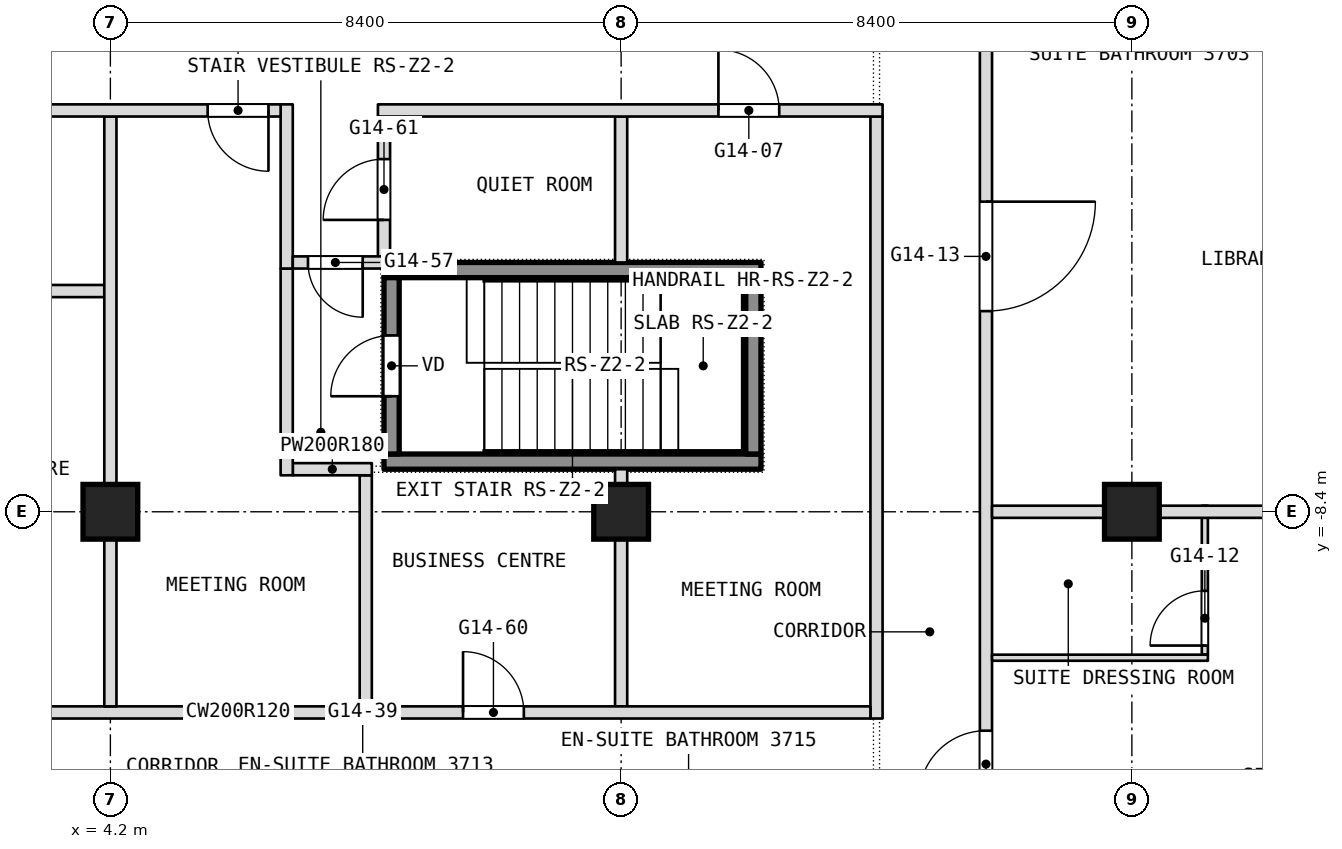
"""IFC4 building model, lengths in metres.
Left out: names, types, materials, properties, quantities, classifications, styles, units other than length and angle.
Written with IfcOpenShell. Run it as: python <this file> out.ifc"""

import sys

from ifc_helpers import new_model, si_unit, direction, frame, frame_2d, origin, origin_2d, place, context, subcontext, project, spatial, rectangle, extrude, element, fill, save


model = new_model("IFC4")
c1 = context("Model", 3, precision=1e-05, world=origin(), true_north=direction((0.0, 1.0)))
c2 = subcontext(c1, "Body", "Model", "MODEL_VIEW")
j1 = project(units=[si_unit("LENGTHUNIT", "METRE"), si_unit("PLANEANGLEUNIT", "RADIAN")], contexts=[c1])
p1 = place(None, origin())
s1 = spatial("IfcSite", under=j1, at=p1, CompositionType="ELEMENT")
p2 = place(p1, origin())
s2 = spatial("IfcBuilding", under=s1, at=p2, CompositionType="ELEMENT")
p3 = place(p2, frame((0.0, 0.0, 158.9)))
s3 = spatial("IfcBuildingStorey", under=s2, at=p3, CompositionType="ELEMENT", Elevation=158.9)
for number, where, z_axis, x_axis in (
    (1, (4.2, -8.4, 0.0), (0.0, 0.0, 1.0), (1.0, 0.0, 0.0)),
    (2, (12.6, -8.4, 0.0), (0.0, 0.0, 1.0), (1.0, 0.0, 0.0)),
    (3, (21.0, -8.4, 0.0), (0.0, 0.0, 1.0), (1.0, 0.0, 0.0)),
):
    element("IfcColumn", number, at=place(p3, frame(where, z_axis=z_axis, x_axis=x_axis)), inside=s3, PredefinedType="COLUMN", context=c2, shape_type="SweptSolid", body=[
        extrude(rectangle(XDim=0.9, YDim=0.9, at=origin_2d()), origin(), (0.0, 0.0, 1.0), 3.6),
    ])
p4 = place(p3, frame((22.2, -10.75, 0.0), z_axis=(0.0, 0.0, 1.0), x_axis=(0.0, 1.0, 0.0)))
e4 = element("IfcWall", 4, at=p4, inside=s3, PredefinedType="PARTITIONING", context=c2, shape_type="SweptSolid", body=[
    extrude(rectangle(XDim=2.45, YDim=0.1, at=frame_2d((1.225, 0.0))), origin(), (0.0, 0.0, 1.0), 3.34),
])
p5 = place(p4, frame((0.15, 0.0, 0.0)))
e5 = element("IfcOpeningElement", 5, at=p5, cuts=e4, PredefinedType="OPENING", context=c2, shape_type="SweptSolid", body=[
    extrude(rectangle(XDim=0.9, YDim=2.1, at=frame_2d((0.45, 1.05))), frame((0.0, 0.05, 0.0), z_axis=(0.0, -1.0, 0.0), x_axis=(1.0, 0.0, 0.0)), (0.0, 0.0, 1.0), 0.1),
])
p6 = place(p3, frame((18.6, -21.708, 0.0), z_axis=(0.0, 0.0, 1.0), x_axis=(0.0, 1.0, 0.0)))
e6 = element("IfcWall", 6, at=p6, inside=s3, PredefinedType="PARTITIONING", context=c2, shape_type="SweptSolid", body=[
    extrude(rectangle(XDim=49.648, YDim=0.2, at=frame_2d((24.824, 0.0))), origin(), (0.0, 0.0, 1.0), 3.34),
])
p7 = place(p6, frame((2.204, 0.0, 0.0)))
e7 = element("IfcOpeningElement", 7, at=p7, cuts=e6, PredefinedType="OPENING", context=c2, shape_type="SweptSolid", body=[
    extrude(rectangle(XDim=0.9, YDim=2.1, at=frame_2d((0.45, 1.05))), frame((0.0, 0.1, 0.0), z_axis=(0.0, -1.0, 0.0), x_axis=(1.0, 0.0, 0.0)), (0.0, 0.0, 1.0), 0.2),
])
p8 = place(p6, frame((8.608, 0.0, 0.0)))
e8 = element("IfcOpeningElement", 8, at=p8, cuts=e6, PredefinedType="OPENING", context=c2, shape_type="SweptSolid", body=[
    extrude(rectangle(XDim=1.1, YDim=2.1, at=frame_2d((0.55, 1.05))), frame((0.0, 0.1, 0.0), z_axis=(0.0, -1.0, 0.0), x_axis=(1.0, 0.0, 0.0)), (0.0, 0.0, 1.0), 0.2),
])
p9 = place(p6, frame((16.608, 0.0, 0.0)))
e9 = element("IfcOpeningElement", 9, at=p9, cuts=e6, PredefinedType="OPENING", context=c2, shape_type="SweptSolid", body=[
    extrude(rectangle(XDim=1.8, YDim=2.1, at=frame_2d((0.9, 1.05))), frame((0.0, 0.1, 0.0), z_axis=(0.0, -1.0, 0.0), x_axis=(1.0, 0.0, 0.0)), (0.0, 0.0, 1.0), 0.2),
])
p10 = place(p6, frame((27.458, 0.0, 0.0)))
e10 = element("IfcOpeningElement", 10, at=p10, cuts=e6, PredefinedType="OPENING", context=c2, shape_type="SweptSolid", body=[
    extrude(rectangle(XDim=1.1, YDim=2.1, at=frame_2d((0.55, 1.05))), frame((0.0, 0.1, 0.0), z_axis=(0.0, -1.0, 0.0), x_axis=(1.0, 0.0, 0.0)), (0.0, 0.0, 1.0), 0.2),
])
p11 = place(p6, frame((30.508, 0.0, 0.0)))
e11 = element("IfcOpeningElement", 11, at=p11, cuts=e6, PredefinedType="OPENING", context=c2, shape_type="SweptSolid", body=[
    extrude(rectangle(XDim=1.0, YDim=2.1, at=frame_2d((0.5, 1.05))), frame((0.0, 0.1, 0.0), z_axis=(0.0, -1.0, 0.0), x_axis=(1.0, 0.0, 0.0)), (0.0, 0.0, 1.0), 0.2),
])
p12 = place(p6, frame((37.108, 0.0, 0.0)))
e12 = element("IfcOpeningElement", 12, at=p12, cuts=e6, PredefinedType="OPENING", context=c2, shape_type="SweptSolid", body=[
    extrude(rectangle(XDim=1.0, YDim=2.1, at=frame_2d((0.5, 1.05))), frame((0.0, 0.1, 0.0), z_axis=(0.0, -1.0, 0.0), x_axis=(1.0, 0.0, 0.0)), (0.0, 0.0, 1.0), 0.2),
])
p13 = place(p6, frame((42.608, 0.0, 0.0)))
e13 = element("IfcOpeningElement", 13, at=p13, cuts=e6, PredefinedType="OPENING", context=c2, shape_type="SweptSolid", body=[
    extrude(rectangle(XDim=1.0, YDim=2.1, at=frame_2d((0.5, 1.05))), frame((0.0, 0.1, 0.0), z_axis=(0.0, -1.0, 0.0), x_axis=(1.0, 0.0, 0.0)), (0.0, 0.0, 1.0), 0.2),
])
p14 = place(p6, frame((44.608, 0.0, 0.0)))
e14 = element("IfcOpeningElement", 14, at=p14, cuts=e6, PredefinedType="OPENING", context=c2, shape_type="SweptSolid", body=[
    extrude(rectangle(XDim=1.0, YDim=2.1, at=frame_2d((0.5, 1.05))), frame((0.0, 0.1, 0.0), z_axis=(0.0, -1.0, 0.0), x_axis=(1.0, 0.0, 0.0)), (0.0, 0.0, 1.0), 0.2),
])
p15 = place(p3, frame((16.8, -11.8, 0.0), z_axis=(0.0, 0.0, 1.0), x_axis=(0.0, 1.0, 0.0)))
e15 = element("IfcWall", 15, at=p15, inside=s3, PredefinedType="PARTITIONING", context=c2, shape_type="SweptSolid", body=[
    extrude(rectangle(XDim=9.9, YDim=0.2, at=frame_2d((4.95, 0.0))), origin(), (0.0, 0.0, 1.0), 3.34),
])
p16 = place(p3, frame((12.6, -11.6, 0.0), z_axis=(0.0, 0.0, 1.0), x_axis=(0.0, 1.0, 0.0)))
e16 = element("IfcWall", 16, at=p16, inside=s3, PredefinedType="PARTITIONING", context=c2, shape_type="SweptSolid", body=[
    extrude(rectangle(XDim=3.9, YDim=0.2, at=frame_2d((1.95, 0.0))), origin(), (0.0, 0.0, 1.0), 3.34),
])
p17 = place(p3, frame((12.6, -4.3, 0.0), z_axis=(0.0, 0.0, 1.0), x_axis=(0.0, 1.0, 0.0)))
e17 = element("IfcWall", 17, at=p17, inside=s3, PredefinedType="PARTITIONING", context=c2, shape_type="SweptSolid", body=[
    extrude(rectangle(XDim=2.4, YDim=0.2, at=frame_2d((1.2, 0.0))), origin(), (0.0, 0.0, 1.0), 3.34),
])
p18 = place(p3, frame((-4.1, -11.7, 0.0), z_axis=(0.0, 0.0, 1.0), x_axis=(1.0, 0.0, 0.0)))
e18 = element("IfcWall", 18, at=p18, inside=s3, PredefinedType="PARTITIONING", context=c2, shape_type="SweptSolid", body=[
    extrude(rectangle(XDim=20.8, YDim=0.2, at=frame_2d((10.4, 0.0))), origin(), (0.0, 0.0, 1.0), 3.34),
])
p19 = place(p18, frame((14.1, 0.0, 0.0)))
e19 = element("IfcOpeningElement", 19, at=p19, cuts=e18, PredefinedType="OPENING", context=c2, shape_type="SweptSolid", body=[
    extrude(rectangle(XDim=1.0, YDim=2.1, at=frame_2d((0.5, 1.05))), frame((0.0, 0.1, 0.0), z_axis=(0.0, -1.0, 0.0), x_axis=(1.0, 0.0, 0.0)), (0.0, 0.0, 1.0), 0.2),
])
p20 = place(p18, frame((5.7, 0.0, 0.0)))
e20 = element("IfcOpeningElement", 20, at=p20, cuts=e18, PredefinedType="OPENING", context=c2, shape_type="SweptSolid", body=[
    extrude(rectangle(XDim=1.0, YDim=2.1, at=frame_2d((0.5, 1.05))), frame((0.0, 0.1, 0.0), z_axis=(0.0, -1.0, 0.0), x_axis=(1.0, 0.0, 0.0)), (0.0, 0.0, 1.0), 0.2),
])
p21 = place(p3, frame((18.7, -10.8, 0.0), z_axis=(0.0, 0.0, 1.0), x_axis=(1.0, 0.0, 0.0)))
e21 = element("IfcWall", 21, at=p21, inside=s3, PredefinedType="PARTITIONING", context=c2, shape_type="SweptSolid", body=[
    extrude(rectangle(XDim=3.55, YDim=0.1, at=frame_2d((1.775, 0.0))), origin(), (0.0, 0.0, 1.0), 3.34),
])
p22 = place(p3, frame((8.7, -4.3, 0.0), z_axis=(0.0, 0.0, 1.0), x_axis=(0.0, 1.0, 0.0)))
e22 = element("IfcWall", 22, at=p22, inside=s3, PredefinedType="PARTITIONING", context=c2, shape_type="SweptSolid", body=[
    extrude(rectangle(XDim=2.4, YDim=0.2, at=frame_2d((1.2, 0.0))), origin(), (0.0, 0.0, 1.0), 3.34),
])
p23 = place(p22, frame((0.7, 0.0, 0.0)))
e23 = element("IfcOpeningElement", 23, at=p23, cuts=e22, PredefinedType="OPENING", context=c2, shape_type="SweptSolid", body=[
    extrude(rectangle(XDim=1.0, YDim=2.1, at=frame_2d((0.5, 1.05))), frame((0.0, 0.1, 0.0), z_axis=(0.0, -1.0, 0.0), x_axis=(1.0, 0.0, 0.0)), (0.0, 0.0, 1.0), 0.2),
])
p24 = place(p3, frame((8.4, -11.6, 0.0), z_axis=(0.0, 0.0, 1.0), x_axis=(0.0, 1.0, 0.0)))
e24 = element("IfcWall", 24, at=p24, inside=s3, PredefinedType="PARTITIONING", context=c2, shape_type="SweptSolid", body=[
    extrude(rectangle(XDim=3.8, YDim=0.2, at=frame_2d((1.9, 0.0))), origin(), (0.0, 0.0, 1.0), 3.34),
])
p25 = place(p3, frame((18.7, -8.4, 0.0), z_axis=(0.0, 0.0, 1.0), x_axis=(1.0, 0.0, 0.0)))
e25 = element("IfcWall", 25, at=p25, inside=s3, PredefinedType="PARTITIONING", context=c2, shape_type="SweptSolid", body=[
    extrude(rectangle(XDim=8.9, YDim=0.2, at=frame_2d((4.45, 0.0))), origin(), (0.0, 0.0, 1.0), 2.89),
])
p26 = place(p3, frame((7.2, -7.7, 0.0), z_axis=(0.0, 0.0, 1.0), x_axis=(1.0, 0.0, 0.0)))
e26 = element("IfcWall", 26, at=p26, inside=s3, PredefinedType="PARTITIONING", context=c2, shape_type="SweptSolid", body=[
    extrude(rectangle(XDim=1.3, YDim=0.2, at=frame_2d((0.65, 0.0))), origin(), (0.0, 0.0, 1.0), 3.34),
])
p27 = place(p3, frame((7.1, -7.8, 0.0), z_axis=(0.0, 0.0, 1.0), x_axis=(0.0, 1.0, 0.0)))
e27 = element("IfcWall", 27, at=p27, inside=s3, PredefinedType="PARTITIONING", context=c2, shape_type="SweptSolid", body=[
    extrude(rectangle(XDim=3.4, YDim=0.2, at=frame_2d((1.7, 0.0))), origin(), (0.0, 0.0, 1.0), 3.34),
])
p28 = place(p3, frame((7.1, -4.4, 0.0), z_axis=(0.0, 0.0, 1.0), x_axis=(0.0, 1.0, 0.0)))
e28 = element("IfcWall", 28, at=p28, inside=s3, PredefinedType="PARTITIONING", context=c2, shape_type="SweptSolid", body=[
    extrude(rectangle(XDim=2.7, YDim=0.2, at=frame_2d((1.35, 0.0))), origin(), (0.0, 0.0, 1.0), 3.34),
])
p29 = place(p3, frame((0.1, -4.77, 0.0), z_axis=(0.0, 0.0, 1.0), x_axis=(1.0, 0.0, 0.0)))
e29 = element("IfcWall", 29, at=p29, inside=s3, PredefinedType="PARTITIONING", context=c2, shape_type="SweptSolid", body=[
    extrude(rectangle(XDim=4.0, YDim=0.2, at=frame_2d((2.0, 0.0))), origin(), (0.0, 0.0, 1.0), 3.34),
])
p30 = place(p3, frame((7.2, -4.3, 0.0), z_axis=(0.0, 0.0, 1.0), x_axis=(1.0, 0.0, 0.0)))
e30 = element("IfcWall", 30, at=p30, inside=s3, PredefinedType="PARTITIONING", context=c2, shape_type="SweptSolid", body=[
    extrude(rectangle(XDim=1.5, YDim=0.2, at=frame_2d((0.75, 0.0))), origin(), (0.0, 0.0, 1.0), 3.34),
])
p31 = place(p30, frame((0.25, 0.0, 0.0)))
e31 = element("IfcOpeningElement", 31, at=p31, cuts=e30, PredefinedType="OPENING", context=c2, shape_type="SweptSolid", body=[
    extrude(rectangle(XDim=0.9, YDim=2.1, at=frame_2d((0.45, 1.05))), frame((0.0, 0.1, 0.0), z_axis=(0.0, -1.0, 0.0), x_axis=(1.0, 0.0, 0.0)), (0.0, 0.0, 1.0), 0.2),
])
p32 = place(p3, frame((4.2, -11.6, 0.0), z_axis=(0.0, 0.0, 1.0), x_axis=(0.0, 1.0, 0.0)))
e32 = element("IfcWall", 32, at=p32, inside=s3, PredefinedType="PARTITIONING", context=c2, shape_type="SweptSolid", body=[
    extrude(rectangle(XDim=9.7, YDim=0.2, at=frame_2d((4.85, 0.0))), origin(), (0.0, 0.0, 1.0), 3.34),
])
p33 = place(p3, frame((-4.3, -1.8, 0.0), z_axis=(0.0, 0.0, 1.0), x_axis=(1.0, 0.0, 0.0)))
e33 = element("IfcWall", 33, at=p33, inside=s3, PredefinedType="PARTITIONING", context=c2, shape_type="SweptSolid", body=[
    extrude(rectangle(XDim=11.3, YDim=0.2, at=frame_2d((5.65, 0.0))), origin(), (0.0, 0.0, 1.0), 3.34),
])
p34 = place(p33, frame((1.7, 0.0, 0.0)))
e34 = element("IfcOpeningElement", 34, at=p34, cuts=e33, PredefinedType="OPENING", context=c2, shape_type="SweptSolid", body=[
    extrude(rectangle(XDim=1.0, YDim=2.1, at=frame_2d((0.5, 1.05))), frame((0.0, 0.1, 0.0), z_axis=(0.0, -1.0, 0.0), x_axis=(1.0, 0.0, 0.0)), (0.0, 0.0, 1.0), 0.2),
])
p35 = place(p33, frame((10.1, 0.0, 0.0)))
e35 = element("IfcOpeningElement", 35, at=p35, cuts=e33, PredefinedType="OPENING", context=c2, shape_type="SweptSolid", body=[
    extrude(rectangle(XDim=1.0, YDim=2.1, at=frame_2d((0.5, 1.05))), frame((0.0, 0.1, 0.0), z_axis=(0.0, -1.0, 0.0), x_axis=(1.0, 0.0, 0.0)), (0.0, 0.0, 1.0), 0.2),
])
p36 = place(p33, frame((5.9, 0.0, 0.0)))
e36 = element("IfcOpeningElement", 36, at=p36, cuts=e33, PredefinedType="OPENING", context=c2, shape_type="SweptSolid", body=[
    extrude(rectangle(XDim=1.0, YDim=2.1, at=frame_2d((0.5, 1.05))), frame((0.0, 0.1, 0.0), z_axis=(0.0, -1.0, 0.0), x_axis=(1.0, 0.0, 0.0)), (0.0, 0.0, 1.0), 0.2),
])
p37 = place(p3, frame((8.6, -1.8, 0.0), z_axis=(0.0, 0.0, 1.0), x_axis=(1.0, 0.0, 0.0)))
e37 = element("IfcWall", 37, at=p37, inside=s3, PredefinedType="PARTITIONING", context=c2, shape_type="SweptSolid", body=[
    extrude(rectangle(XDim=8.3, YDim=0.2, at=frame_2d((4.15, 0.0))), origin(), (0.0, 0.0, 1.0), 3.34),
])
p38 = place(p37, frame((5.6, 0.0, 0.0)))
e38 = element("IfcOpeningElement", 38, at=p38, cuts=e37, PredefinedType="OPENING", context=c2, shape_type="SweptSolid", body=[
    extrude(rectangle(XDim=1.0, YDim=2.1, at=frame_2d((0.5, 1.05))), frame((0.0, 0.1, 0.0), z_axis=(0.0, -1.0, 0.0), x_axis=(1.0, 0.0, 0.0)), (0.0, 0.0, 1.0), 0.2),
])
for number, where, z_axis, x_axis in (
    (39, (8.7, -7.575, 0.1), (0.0, 0.0, 1.0), (1.0, 0.0, 0.0)),
    (40, (8.7, -4.425, 0.1), (0.0, 0.0, 1.0), (1.0, 0.0, 0.0)),
):
    element("IfcWall", number, at=place(p3, frame(where, z_axis=z_axis, x_axis=x_axis)), inside=s3, PredefinedType="SHEAR", context=c2, shape_type="SweptSolid", body=[
        extrude(rectangle(XDim=6.2, YDim=0.25, at=frame_2d((3.1, 0.0))), origin(), (0.0, 0.0, 1.0), 3.6),
    ])
p39 = place(p3, frame((8.825, -7.45, 0.1), z_axis=(0.0, 0.0, 1.0), x_axis=(0.0, 1.0, 0.0)))
e41 = element("IfcWall", 41, at=p39, inside=s3, PredefinedType="SHEAR", context=c2, shape_type="SweptSolid", body=[
    extrude(rectangle(XDim=2.9, YDim=0.25, at=frame_2d((1.45, 0.0))), origin(), (0.0, 0.0, 1.0), 3.6),
])
p40 = place(p39, frame((0.95, 0.0, 0.0)))
e42 = element("IfcOpeningElement", 42, at=p40, cuts=e41, PredefinedType="OPENING", context=c2, shape_type="SweptSolid", body=[
    extrude(rectangle(XDim=1.0, YDim=2.1, at=frame_2d((0.5, 1.05))), frame((0.0, 0.125, 0.0), z_axis=(0.0, -1.0, 0.0), x_axis=(1.0, 0.0, 0.0)), (0.0, 0.0, 1.0), 0.25),
])
p41 = place(p3, frame((14.775, -7.45, 0.1), z_axis=(0.0, 0.0, 1.0), x_axis=(0.0, 1.0, 0.0)))
e43 = element("IfcWall", 43, at=p41, inside=s3, PredefinedType="SHEAR", context=c2, shape_type="SweptSolid", body=[
    extrude(rectangle(XDim=2.9, YDim=0.25, at=frame_2d((1.45, 0.0))), origin(), (0.0, 0.0, 1.0), 3.6),
])
p42 = place(p5, origin())
e44 = element("IfcDoor", 44, at=p42, inside=s3, OperationType="SINGLE_SWING_LEFT", PredefinedType="DOOR", context=c2, shape_type="SweptSolid", body=[
    extrude(rectangle(XDim=0.9, YDim=2.1, at=frame_2d((0.45, 1.05))), frame((0.0, 0.025, 0.0), z_axis=(0.0, -1.0, 0.0), x_axis=(1.0, 0.0, 0.0)), (0.0, 0.0, 1.0), 0.05),
])
fill(e5, e44)
p43 = place(p8, origin())
e45 = element("IfcDoor", 45, at=p43, inside=s3, OperationType="SINGLE_SWING_RIGHT", PredefinedType="DOOR", context=c2, shape_type="SweptSolid", body=[
    extrude(rectangle(XDim=1.1, YDim=2.1, at=frame_2d((0.55, 1.05))), frame((0.0, 0.025, 0.0), z_axis=(0.0, -1.0, 0.0), x_axis=(1.0, 0.0, 0.0)), (0.0, 0.0, 1.0), 0.05),
])
fill(e8, e45)
p44 = place(p9, origin())
e46 = element("IfcDoor", 46, at=p44, inside=s3, OperationType="DOUBLE_DOOR_SINGLE_SWING", PredefinedType="DOOR", context=c2, shape_type="SweptSolid", body=[
    extrude(rectangle(XDim=1.8, YDim=2.1, at=frame_2d((0.9, 1.05))), frame((0.0, 0.025, 0.0), z_axis=(0.0, -1.0, 0.0), x_axis=(1.0, 0.0, 0.0)), (0.0, 0.0, 1.0), 0.05),
])
fill(e9, e46)
p45 = place(p19, origin())
e47 = element("IfcDoor", 47, at=p45, inside=s3, OperationType="SINGLE_SWING_RIGHT", PredefinedType="DOOR", context=c2, shape_type="SweptSolid", body=[
    extrude(rectangle(XDim=1.0, YDim=2.1, at=frame_2d((0.5, 1.05))), frame((0.0, 0.025, 0.0), z_axis=(0.0, -1.0, 0.0), x_axis=(1.0, 0.0, 0.0)), (0.0, 0.0, 1.0), 0.05),
])
fill(e19, e47)
p46 = place(p23, origin())
e48 = element("IfcDoor", 48, at=p46, inside=s3, OperationType="SINGLE_SWING_LEFT", PredefinedType="DOOR", context=c2, shape_type="SweptSolid", body=[
    extrude(rectangle(XDim=1.0, YDim=2.1, at=frame_2d((0.5, 1.05))), frame((0.0, 0.025, 0.0), z_axis=(0.0, -1.0, 0.0), x_axis=(1.0, 0.0, 0.0)), (0.0, 0.0, 1.0), 0.05),
])
fill(e23, e48)
p47 = place(p31, origin())
e49 = element("IfcDoor", 49, at=p47, inside=s3, OperationType="SINGLE_SWING_LEFT", PredefinedType="DOOR", context=c2, shape_type="SweptSolid", body=[
    extrude(rectangle(XDim=0.9, YDim=2.1, at=frame_2d((0.45, 1.05))), frame((0.0, 0.025, 0.0), z_axis=(0.0, -1.0, 0.0), x_axis=(1.0, 0.0, 0.0)), (0.0, 0.0, 1.0), 0.05),
])
fill(e31, e49)
p48 = place(p35, origin())
e50 = element("IfcDoor", 50, at=p48, inside=s3, OperationType="SINGLE_SWING_LEFT", PredefinedType="DOOR", context=c2, shape_type="SweptSolid", body=[
    extrude(rectangle(XDim=1.0, YDim=2.1, at=frame_2d((0.5, 1.05))), frame((0.0, 0.025, 0.0), z_axis=(0.0, -1.0, 0.0), x_axis=(1.0, 0.0, 0.0)), (0.0, 0.0, 1.0), 0.05),
])
fill(e35, e50)
p49 = place(p38, origin())
e51 = element("IfcDoor", 51, at=p49, inside=s3, OperationType="SINGLE_SWING_LEFT", PredefinedType="DOOR", context=c2, shape_type="SweptSolid", body=[
    extrude(rectangle(XDim=1.0, YDim=2.1, at=frame_2d((0.5, 1.05))), frame((0.0, 0.025, 0.0), z_axis=(0.0, -1.0, 0.0), x_axis=(1.0, 0.0, 0.0)), (0.0, 0.0, 1.0), 0.05),
])
fill(e38, e51)
p50 = place(p40, origin())
e52 = element("IfcDoor", 52, at=p50, inside=s3, OperationType="SINGLE_SWING_LEFT", PredefinedType="DOOR", context=c2, shape_type="SweptSolid", body=[
    extrude(rectangle(XDim=1.0, YDim=2.1, at=frame_2d((0.5, 1.05))), frame((0.0, 0.025, 0.0), z_axis=(0.0, -1.0, 0.0), x_axis=(1.0, 0.0, 0.0)), (0.0, 0.0, 1.0), 0.05),
])
fill(e42, e52)
save(model, sys.argv[1])
